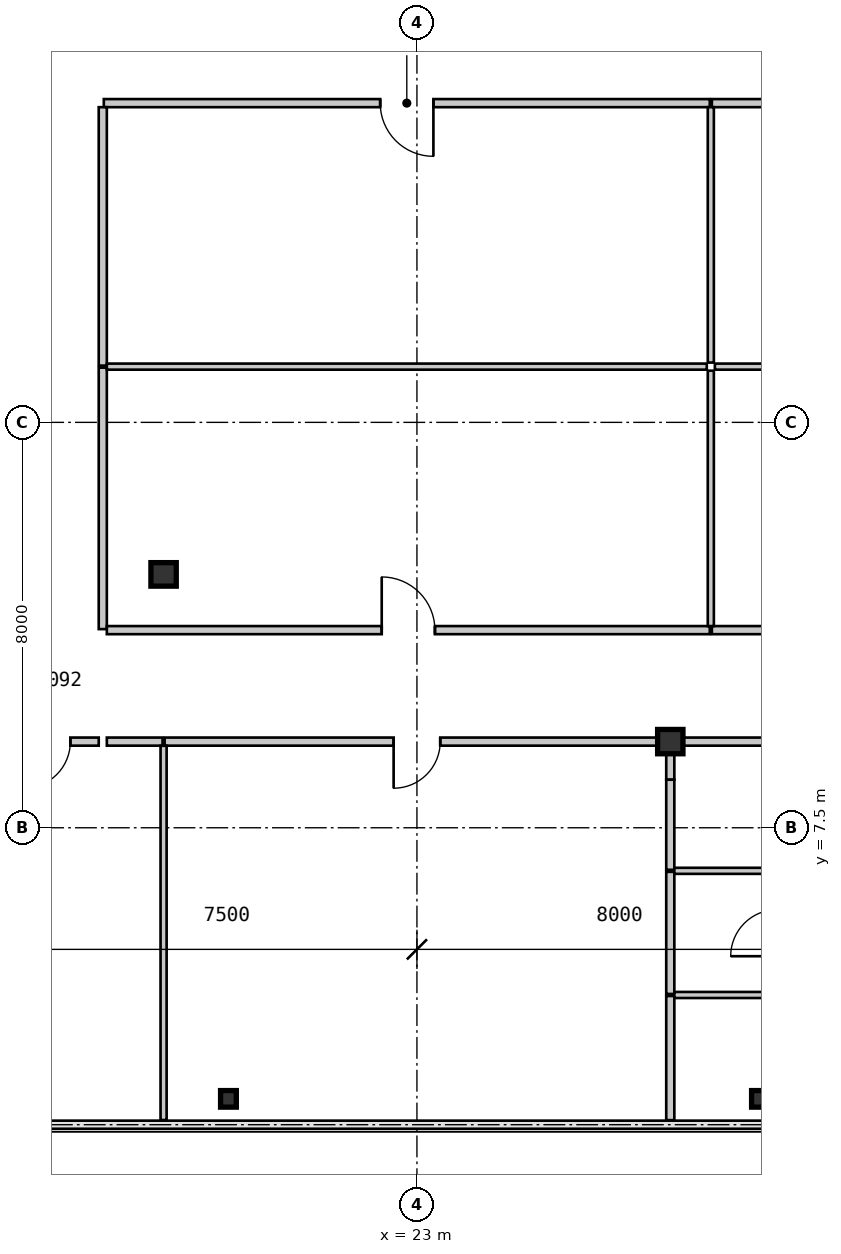
"""IFC4 building model, lengths in metres.
Left out: names, types, materials, properties, quantities, classifications, styles, units other than length and angle.
Written with IfcOpenShell. Run it as: python <this file> out.ifc"""

import sys

from ifc_helpers import new_model, si_unit, direction, frame, frame_2d, origin, origin_2d, place, context, subcontext, project, spatial, rectangle, i_section, extrude, source, transform, mapped, element, fill, save


model = new_model("IFC4")
c1 = context("Model", 3, precision=1e-05, world=origin(), true_north=direction((0.0, 1.0)))
c2 = subcontext(c1, "Body", "Model", "MODEL_VIEW")
j1 = project(units=[si_unit("LENGTHUNIT", "METRE"), si_unit("PLANEANGLEUNIT", "RADIAN")], contexts=[c1])
p1 = place(None, origin())
s1 = spatial("IfcSite", under=j1, at=p1, CompositionType="ELEMENT")
p2 = place(p1, origin())
s2 = spatial("IfcBuilding", under=s1, at=p2, CompositionType="ELEMENT")
p3 = place(p2, frame((0.0, 0.0, 45.15)))
s3 = spatial("IfcBuildingStorey", under=s2, at=p3, CompositionType="ELEMENT", Elevation=45.15)
m1 = source(origin(), c2, "Body", "SweptSolid", [
    extrude(i_section(OverallWidth=0.5, OverallDepth=0.48, WebThickness=0.028, FlangeThickness=0.044, at=origin_2d()), origin(), (0.0, 0.0, 1.0), 3.15),
])
p4 = place(p3, frame((28.0, 9.2, 0.0), z_axis=(0.0, 0.0, 1.0), x_axis=(1.0, 0.0, 0.0)))
e1 = element("IfcColumn", 1, at=p4, inside=s3, PredefinedType="COLUMN", context=c2, shape_type="MappedRepresentation", body=[
    mapped(m1, transform((0.0, 0.0, 0.0), scale=1.0)),
])
m2 = source(origin(), c2, "Body", "SweptSolid", [
    extrude(i_section(OverallWidth=0.5, OverallDepth=0.464, WebThickness=0.022, FlangeThickness=0.034, at=origin_2d()), origin(), (0.0, 0.0, 1.0), 3.15),
])
p5 = place(p3, frame((18.0, 12.5, 0.0), z_axis=(0.0, 0.0, 1.0), x_axis=(1.0, 0.0, 0.0)))
e2 = element("IfcColumn", 2, at=p5, inside=s3, PredefinedType="COLUMN", context=c2, shape_type="MappedRepresentation", body=[
    mapped(m2, transform((0.0, 0.0, 0.0), scale=1.0)),
])
m3 = source(origin(), c2, "Body", "SweptSolid", [
    extrude(i_section(OverallWidth=0.311, OverallDepth=0.327, WebThickness=0.016, FlangeThickness=0.025, at=origin_2d()), origin(), (0.0, 0.0, 1.0), 3.15),
])
for number, where, z_axis, x_axis in (
    (3, (19.28, 2.15, 0.0), (0.0, 0.0, 1.0), (1.0, 0.0, 0.0)),
    (4, (29.76, 2.15, 0.0), (0.0, 0.0, 1.0), (1.0, 0.0, 0.0)),
):
    element("IfcColumn", number, at=place(p3, frame(where, z_axis=z_axis, x_axis=x_axis)), inside=s3, PredefinedType="COLUMN", context=c2, shape_type="MappedRepresentation", body=[
        mapped(m3, transform((0.0, 0.0, 0.0), scale=1.0)),
    ])
m4 = source(origin(), c2, "Body", "SweptSolid", [
    extrude(rectangle(XDim=5.16, YDim=0.16, at=frame_2d((2.58, 0.0))), origin(), (0.0, 0.0, 1.0), 2.93),
])
p6 = place(p3, frame((16.8, 16.58, 0.0), z_axis=(0.0, 0.0, 1.0), x_axis=(0.0, -1.0, 0.0)))
e5 = element("IfcWall", 5, at=p6, inside=s3, PredefinedType="PARTITIONING", context=c2, shape_type="MappedRepresentation", body=[
    mapped(m4, transform((0.0, 0.0, 0.0), scale=1.0)),
])
m5 = source(origin(), c2, "Body", "SweptSolid", [
    extrude(rectangle(XDim=11.959, YDim=0.16, at=frame_2d((5.98, 0.0))), origin(), (0.0, 0.0, 1.0), 2.93),
])
p7 = place(p3, frame((28.78, 21.8, 0.0), z_axis=(0.0, 0.0, 1.0), x_axis=(-1.0, 0.0, 0.0)))
e6 = element("IfcWall", 6, at=p7, inside=s3, PredefinedType="PARTITIONING", context=c2, shape_type="MappedRepresentation", body=[
    mapped(m5, transform((0.0, 0.0, 0.0), scale=1.0)),
])
m6 = source(origin(), c2, "Body", "SweptSolid", [
    extrude(rectangle(XDim=1.05, YDim=2.1, at=frame_2d((0.525, 1.05))), frame((0.0, 0.09, 0.0), z_axis=(0.0, -1.0, 0.0), x_axis=(1.0, 0.0, 0.0)), (0.0, 0.0, 1.0), 0.18),
])
p8 = place(p7, frame((5.455, 0.0, 0.0)))
e7 = element("IfcOpeningElement", 7, at=p8, cuts=e6, PredefinedType="OPENING", context=c2, shape_type="MappedRepresentation", body=[
    mapped(m6, transform((0.0, 0.0, 0.0), scale=1.0)),
])
m7 = source(origin(), c2, "Body", "SweptSolid", [
    extrude(rectangle(XDim=5.1, YDim=0.16, at=frame_2d((2.55, 0.0))), origin(), (0.0, 0.0, 1.0), 2.93),
])
p9 = place(p3, frame((16.8, 21.72, 0.0), z_axis=(0.0, 0.0, 1.0), x_axis=(0.0, -1.0, 0.0)))
e8 = element("IfcWall", 8, at=p9, inside=s3, PredefinedType="PARTITIONING", context=c2, shape_type="MappedRepresentation", body=[
    mapped(m7, transform((0.0, 0.0, 0.0), scale=1.0)),
])
m8 = source(origin(), c2, "Body", "SweptSolid", [
    extrude(rectangle(XDim=12.159, YDim=0.16, at=frame_2d((6.08, 0.0))), origin(), (0.0, 0.0, 1.0), 2.93),
])
p10 = place(p3, frame((40.98, 21.8, 0.0), z_axis=(0.0, 0.0, 1.0), x_axis=(-1.0, 0.0, 0.0)))
e9 = element("IfcWall", 9, at=p10, inside=s3, PredefinedType="PARTITIONING", context=c2, shape_type="MappedRepresentation", body=[
    mapped(m8, transform((0.0, 0.0, 0.0), scale=1.0)),
])
p11 = place(p10, frame((5.555, 0.0, 0.0)))
e10 = element("IfcOpeningElement", 10, at=p11, cuts=e9, PredefinedType="OPENING", context=c2, shape_type="MappedRepresentation", body=[
    mapped(m6, transform((0.0, 0.0, 0.0), scale=1.0)),
])
m9 = source(origin(), c2, "Body", "SweptSolid", [
    extrude(rectangle(XDim=2.04, YDim=0.16, at=frame_2d((1.02, 0.0))), origin(), (0.0, 0.0, 1.0), 2.93),
])
p12 = place(p3, frame((16.72, 9.2, 0.0), z_axis=(0.0, 0.0, 1.0), x_axis=(-1.0, 0.0, 0.0)))
e11 = element("IfcWall", 11, at=p12, inside=s3, PredefinedType="PARTITIONING", context=c2, shape_type="MappedRepresentation", body=[
    mapped(m9, transform((0.0, 0.0, 0.0), scale=1.0)),
])
m10 = source(origin(), c2, "Body", "SweptSolid", [
    extrude(rectangle(XDim=0.92, YDim=2.1, at=frame_2d((0.46, 1.05))), frame((0.0, 0.09, 0.0), z_axis=(0.0, -1.0, 0.0), x_axis=(1.0, 0.0, 0.0)), (0.0, 0.0, 1.0), 0.18),
])
p13 = place(p12, frame((0.56, 0.0, 0.0)))
e12 = element("IfcOpeningElement", 12, at=p13, cuts=e11, PredefinedType="OPENING", context=c2, shape_type="MappedRepresentation", body=[
    mapped(m10, transform((0.0, 0.0, 0.0), scale=1.0)),
])
m11 = source(origin(), c2, "Body", "SweptSolid", [
    extrude(rectangle(XDim=11.9, YDim=0.16, at=frame_2d((5.95, 0.0))), origin(), (0.0, 0.0, 1.0), 2.93),
])
p14 = place(p3, frame((16.88, 11.4, 0.0), z_axis=(0.0, 0.0, 1.0), x_axis=(1.0, 0.0, 0.0)))
e13 = element("IfcWall", 13, at=p14, inside=s3, PredefinedType="PARTITIONING", context=c2, shape_type="MappedRepresentation", body=[
    mapped(m11, transform((0.0, 0.0, 0.0), scale=1.0)),
])
p15 = place(p14, frame((5.425, 0.0, 0.0)))
e14 = element("IfcOpeningElement", 14, at=p15, cuts=e13, PredefinedType="OPENING", context=c2, shape_type="MappedRepresentation", body=[
    mapped(m6, transform((0.0, 0.0, 0.0), scale=1.0)),
])
p16 = place(p3, frame((28.82, 11.4, 0.0), z_axis=(0.0, 0.0, 1.0), x_axis=(1.0, 0.0, 0.0)))
e15 = element("IfcWall", 15, at=p16, inside=s3, PredefinedType="PARTITIONING", context=c2, shape_type="MappedRepresentation", body=[
    mapped(m8, transform((0.0, 0.0, 0.0), scale=1.0)),
])
p17 = place(p16, frame((5.555, 0.0, 0.0)))
e16 = element("IfcOpeningElement", 16, at=p17, cuts=e15, PredefinedType="OPENING", context=c2, shape_type="MappedRepresentation", body=[
    mapped(m6, transform((0.0, 0.0, 0.0), scale=1.0)),
])
m12 = source(origin(), c2, "Body", "SweptSolid", [
    extrude(rectangle(XDim=1.1, YDim=0.16, at=frame_2d((0.55, 0.0))), origin(), (0.0, 0.0, 1.0), 2.93),
])
p18 = place(p3, frame((17.98, 9.2, 0.0), z_axis=(0.0, 0.0, 1.0), x_axis=(-1.0, 0.0, 0.0)))
e17 = element("IfcWall", 17, at=p18, inside=s3, PredefinedType="PARTITIONING", context=c2, shape_type="MappedRepresentation", body=[
    mapped(m12, transform((0.0, 0.0, 0.0), scale=1.0)),
])
m13 = source(origin(), c2, "Body", "SweptSolid", [
    extrude(rectangle(XDim=9.959, YDim=0.16, at=frame_2d((4.98, 0.0))), origin(), (0.0, 0.0, 1.0), 2.93),
])
p19 = place(p3, frame((27.98, 9.2, 0.0), z_axis=(0.0, 0.0, 1.0), x_axis=(-1.0, 0.0, 0.0)))
e18 = element("IfcWall", 18, at=p19, inside=s3, PredefinedType="PARTITIONING", context=c2, shape_type="MappedRepresentation", body=[
    mapped(m13, transform((0.0, 0.0, 0.0), scale=1.0)),
])
p20 = place(p19, frame((4.52, 0.0, 0.0)))
e19 = element("IfcOpeningElement", 19, at=p20, cuts=e18, PredefinedType="OPENING", context=c2, shape_type="MappedRepresentation", body=[
    mapped(m10, transform((0.0, 0.0, 0.0), scale=1.0)),
])
m14 = source(origin(), c2, "Body", "SweptSolid", [
    extrude(rectangle(XDim=4.76, YDim=0.16, at=frame_2d((2.38, 0.0))), origin(), (0.0, 0.0, 1.0), 2.328),
])
p21 = place(p3, frame((32.78, 9.2, 0.0), z_axis=(0.0, 0.0, 1.0), x_axis=(-1.0, 0.0, 0.0)))
e20 = element("IfcWall", 20, at=p21, inside=s3, PredefinedType="PARTITIONING", context=c2, shape_type="MappedRepresentation", body=[
    mapped(m14, transform((0.0, 0.0, 0.0), scale=1.0)),
])
p22 = place(p21, frame((1.855, 0.0, 0.0)))
e21 = element("IfcOpeningElement", 21, at=p22, cuts=e20, PredefinedType="OPENING", context=c2, shape_type="MappedRepresentation", body=[
    mapped(m6, transform((0.0, 0.0, 0.0), scale=1.0)),
])
m15 = source(origin(), c2, "Body", "SweptSolid", [
    extrude(rectangle(XDim=11.84, YDim=0.12, at=frame_2d((5.92, 0.0))), origin(), (0.0, 0.0, 1.0), 2.93),
])
p23 = place(p3, frame((16.88, 16.6, 0.0), z_axis=(0.0, 0.0, 1.0), x_axis=(1.0, 0.0, 0.0)))
e22 = element("IfcWall", 22, at=p23, inside=s3, PredefinedType="PARTITIONING", context=c2, shape_type="MappedRepresentation", body=[
    mapped(m15, transform((0.0, 0.0, 0.0), scale=1.0)),
])
m16 = source(origin(), c2, "Body", "SweptSolid", [
    extrude(rectangle(XDim=5.04, YDim=0.12, at=frame_2d((2.52, 0.0))), origin(), (0.0, 0.0, 1.0), 2.93),
])
for number, where, z_axis, x_axis in (
    (23, (28.8, 16.52, 0.0), (0.0, 0.0, 1.0), (0.0, -1.0, 0.0)),
    (24, (28.8, 21.72, 0.0), (0.0, 0.0, 1.0), (0.0, -1.0, 0.0)),
):
    element("IfcWall", number, at=place(p3, frame(where, z_axis=z_axis, x_axis=x_axis)), inside=s3, PredefinedType="PARTITIONING", context=c2, shape_type="MappedRepresentation", body=[
        mapped(m16, transform((0.0, 0.0, 0.0), scale=1.0)),
    ])
m17 = source(origin(), c2, "Body", "SweptSolid", [
    extrude(rectangle(XDim=12.04, YDim=0.12, at=frame_2d((6.02, 0.0))), origin(), (0.0, 0.0, 1.0), 2.93),
])
p24 = place(p3, frame((28.88, 16.6, 0.0), z_axis=(0.0, 0.0, 1.0), x_axis=(1.0, 0.0, 0.0)))
e25 = element("IfcWall", 25, at=p24, inside=s3, PredefinedType="PARTITIONING", context=c2, shape_type="MappedRepresentation", body=[
    mapped(m17, transform((0.0, 0.0, 0.0), scale=1.0)),
])
m18 = source(origin(), c2, "Body", "SweptSolid", [
    extrude(rectangle(XDim=7.386, YDim=0.12, at=frame_2d((3.693, 0.0))), origin(), (0.0, 0.0, 1.0), 2.93),
])
p25 = place(p3, frame((18.0, 9.118, 0.0), z_axis=(0.0, 0.0, 1.0), x_axis=(0.0, -1.0, 0.0)))
e26 = element("IfcWall", 26, at=p25, inside=s3, PredefinedType="PARTITIONING", context=c2, shape_type="MappedRepresentation", body=[
    mapped(m18, transform((0.0, 0.0, 0.0), scale=1.0)),
])
m19 = source(origin(), c2, "Body", "SweptSolid", [
    extrude(rectangle(XDim=2.45, YDim=0.16, at=frame_2d((1.225, 0.0))), origin(), (0.0, 0.0, 1.0), 2.93),
])
p26 = place(p3, frame((28.0, 4.18, 0.0), z_axis=(0.0, 0.0, 1.0), x_axis=(0.0, -1.0, 0.0)))
e27 = element("IfcWall", 27, at=p26, inside=s3, PredefinedType="PARTITIONING", context=c2, shape_type="MappedRepresentation", body=[
    mapped(m19, transform((0.0, 0.0, 0.0), scale=1.0)),
])
m20 = source(origin(), c2, "Body", "SweptSolid", [
    extrude(rectangle(XDim=0.672, YDim=0.16, at=frame_2d((0.336, 0.0))), origin(), (0.0, 0.0, 1.0), 2.397),
])
p27 = place(p3, frame((28.0, 9.12, 0.0), z_axis=(0.0, 0.0, 1.0), x_axis=(0.0, -1.0, 0.0)))
e28 = element("IfcWall", 28, at=p27, inside=s3, PredefinedType="PARTITIONING", context=c2, shape_type="MappedRepresentation", body=[
    mapped(m20, transform((0.0, 0.0, 0.0), scale=1.0)),
])
m21 = source(origin(), c2, "Body", "SweptSolid", [
    extrude(rectangle(XDim=1.778, YDim=0.16, at=frame_2d((0.889, 0.0))), origin(), (0.0, 0.0, 1.0), 2.93),
])
p28 = place(p3, frame((28.0, 8.448, 0.0), z_axis=(0.0, 0.0, 1.0), x_axis=(0.0, -1.0, 0.0)))
e29 = element("IfcWall", 29, at=p28, inside=s3, PredefinedType="PARTITIONING", context=c2, shape_type="MappedRepresentation", body=[
    mapped(m21, transform((0.0, 0.0, 0.0), scale=1.0)),
])
m22 = source(origin(), c2, "Body", "SweptSolid", [
    extrude(rectangle(XDim=2.41, YDim=0.16, at=frame_2d((1.205, 0.0))), origin(), (0.0, 0.0, 1.0), 2.93),
])
p29 = place(p3, frame((28.0, 6.63, 0.0), z_axis=(0.0, 0.0, 1.0), x_axis=(0.0, -1.0, 0.0)))
e30 = element("IfcWall", 30, at=p29, inside=s3, PredefinedType="PARTITIONING", context=c2, shape_type="MappedRepresentation", body=[
    mapped(m22, transform((0.0, 0.0, 0.0), scale=1.0)),
])
m23 = source(origin(), c2, "Body", "SweptSolid", [
    extrude(rectangle(XDim=2.012, YDim=0.12, at=frame_2d((1.006, 0.0))), origin(), (0.0, 0.0, 1.0), 2.93),
])
for number, where, z_axis, x_axis in (
    (31, (28.08, 4.2, 0.0), (0.0, 0.0, 1.0), (1.0, 0.0, 0.0)),
    (32, (30.092, 6.65, 0.0), (0.0, 0.0, 1.0), (-1.0, 0.0, 0.0)),
):
    element("IfcWall", number, at=place(p3, frame(where, z_axis=z_axis, x_axis=x_axis)), inside=s3, PredefinedType="PARTITIONING", context=c2, shape_type="MappedRepresentation", body=[
        mapped(m23, transform((0.0, 0.0, 0.0), scale=1.0)),
    ])
m24 = source(origin(), c2, "Body", "SweptSolid", [
    extrude(rectangle(XDim=1.05, YDim=2.1, at=frame_2d((0.525, 1.05))), frame((0.0, 0.025, 0.0), z_axis=(0.0, -1.0, 0.0), x_axis=(1.0, 0.0, 0.0)), (0.0, 0.0, 1.0), 0.05),
])
p30 = place(p8, origin())
e33 = element("IfcDoor", 33, at=p30, inside=s3, OperationType="SINGLE_SWING_LEFT", PredefinedType="DOOR", context=c2, shape_type="MappedRepresentation", body=[
    mapped(m24, transform((0.0, 0.0, 0.0), scale=1.0)),
])
fill(e7, e33)
m25 = source(origin(), c2, "Body", "SweptSolid", [
    extrude(rectangle(XDim=0.92, YDim=2.1, at=frame_2d((0.46, 1.05))), frame((0.0, 0.025, 0.0), z_axis=(0.0, -1.0, 0.0), x_axis=(1.0, 0.0, 0.0)), (0.0, 0.0, 1.0), 0.05),
])
p31 = place(p13, origin())
e34 = element("IfcDoor", 34, at=p31, inside=s3, OperationType="SINGLE_SWING_RIGHT", PredefinedType="DOOR", context=c2, shape_type="MappedRepresentation", body=[
    mapped(m25, transform((0.0, 0.0, 0.0), scale=1.0)),
])
fill(e12, e34)
p32 = place(p15, origin())
e35 = element("IfcDoor", 35, at=p32, inside=s3, OperationType="SINGLE_SWING_LEFT", PredefinedType="DOOR", context=c2, shape_type="MappedRepresentation", body=[
    mapped(m24, transform((0.0, 0.0, 0.0), scale=1.0)),
])
fill(e14, e35)
p33 = place(p20, origin())
e36 = element("IfcDoor", 36, at=p33, inside=s3, OperationType="SINGLE_SWING_RIGHT", PredefinedType="DOOR", context=c2, shape_type="MappedRepresentation", body=[
    mapped(m25, transform((0.0, 0.0, 0.0), scale=1.0)),
])
fill(e19, e36)
save(model, sys.argv[1])
